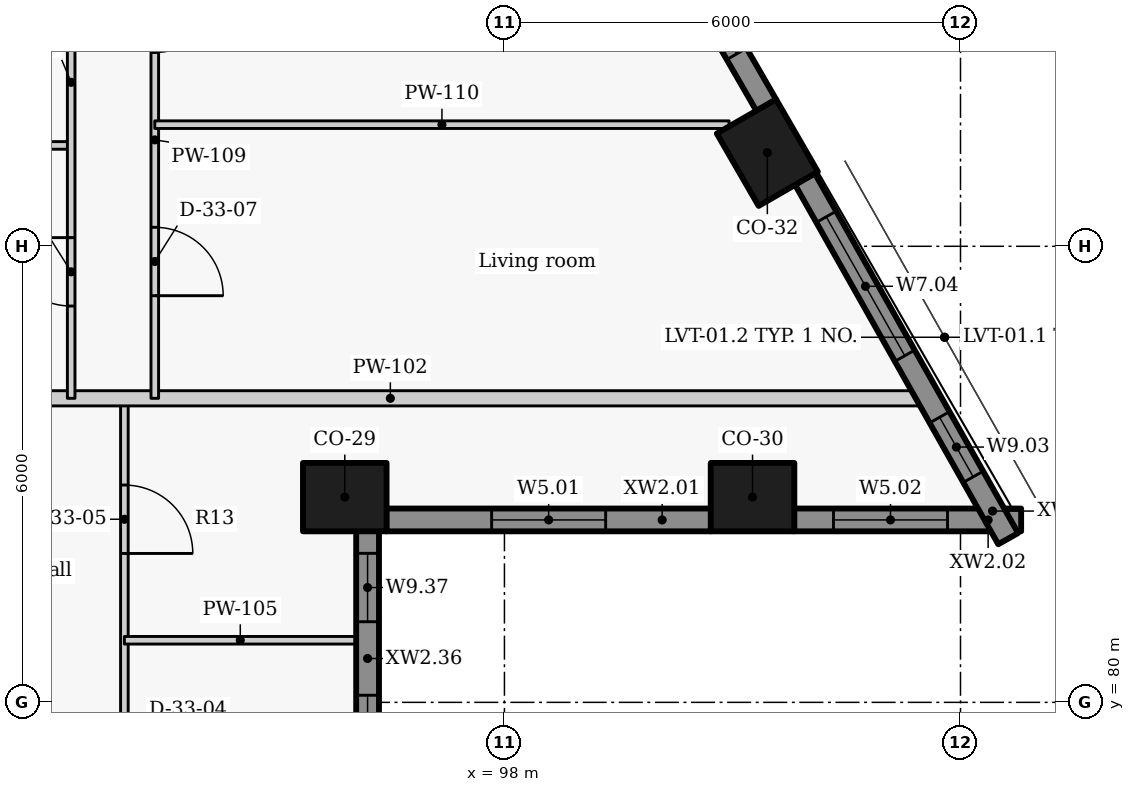
"""IFC4 building model, lengths in metres.
Left out: names, types, materials, properties, quantities, classifications, styles, units other than length and angle.
Written with IfcOpenShell. Run it as: python <this file> out.ifc"""

import sys

from ifc_helpers import new_model, si_unit, direction, frame, frame_2d, origin, origin_2d, place, context, subcontext, project, spatial, rectangle, extrude, element, fill, save


model = new_model("IFC4")
c1 = context("Model", 3, precision=1e-05, world=origin(), true_north=direction((0.0, 1.0)))
c2 = subcontext(c1, "Body", "Model", "MODEL_VIEW")
j1 = project(units=[si_unit("LENGTHUNIT", "METRE"), si_unit("PLANEANGLEUNIT", "RADIAN")], contexts=[c1])
p1 = place(None, origin())
s1 = spatial("IfcSite", under=j1, at=p1, CompositionType="ELEMENT")
p2 = place(p1, origin())
s2 = spatial("IfcBuilding", under=s1, at=p2, CompositionType="ELEMENT")
p3 = place(p2, frame((0.0, 0.0, 249.3)))
s3 = spatial("IfcBuildingStorey", under=s2, at=p3, CompositionType="ELEMENT", Elevation=249.3)
for number, where, z_axis, x_axis in (
    (1, (95.899, 82.7, 0.0), (0.0, 0.0, 1.0), (1.0, 0.0, 0.0)),
    (2, (101.264, 82.7, 0.0), (0.0, 0.0, 1.0), (1.0, 0.0, 0.0)),
    (3, (101.459, 87.232, 0.0), (0.0, 0.0, 1.0), (-0.5, 0.866, 0.0)),
):
    element("IfcColumn", number, at=place(p3, frame(where, z_axis=z_axis, x_axis=x_axis)), inside=s3, PredefinedType="COLUMN", context=c2, shape_type="SweptSolid", body=[
        extrude(rectangle(XDim=1.1, YDim=0.9, at=origin_2d()), origin(), (0.0, 0.0, 1.0), 3.3),
    ])
p4 = place(p3, frame((96.446, 82.4, 0.0), z_axis=(0.0, 0.0, 1.0), x_axis=(1.0, 0.0, 0.0)))
e4 = element("IfcWall", 4, at=p4, inside=s3, PredefinedType="SOLIDWALL", context=c2, shape_type="SweptSolid", body=[
    extrude(rectangle(XDim=4.272, YDim=0.3, at=frame_2d((2.136, 0.0))), origin(), (0.0, 0.0, 1.0), 2.425),
])
p5 = place(p4, frame((1.386, 0.0, 0.9)))
e5 = element("IfcOpeningElement", 5, at=p5, cuts=e4, PredefinedType="OPENING", context=c2, shape_type="SweptSolid", body=[
    extrude(rectangle(XDim=1.5, YDim=1.1, at=frame_2d((0.75, 0.55))), frame((0.0, 0.16, 0.0), z_axis=(0.0, -1.0, 0.0), x_axis=(1.0, 0.0, 0.0)), (0.0, 0.0, 1.0), 0.32),
])
p6 = place(p3, frame((101.81, 82.4, 0.0), z_axis=(0.0, 0.0, 1.0), x_axis=(1.0, 0.0, 0.0)))
e6 = element("IfcWall", 6, at=p6, inside=s3, PredefinedType="SOLIDWALL", context=c2, shape_type="SweptSolid", body=[
    extrude(rectangle(XDim=2.988, YDim=0.3, at=frame_2d((1.494, 0.0))), origin(), (0.0, 0.0, 1.0), 2.425),
])
p7 = place(p6, frame((0.519, 0.0, 0.9)))
e7 = element("IfcOpeningElement", 7, at=p7, cuts=e6, PredefinedType="OPENING", context=c2, shape_type="SweptSolid", body=[
    extrude(rectangle(XDim=1.5, YDim=1.1, at=frame_2d((0.75, 0.55))), frame((0.0, 0.16, 0.0), z_axis=(0.0, -1.0, 0.0), x_axis=(1.0, 0.0, 0.0)), (0.0, 0.0, 1.0), 0.32),
])
p8 = place(p3, frame((104.627, 82.154, 0.0), z_axis=(0.0, 0.0, 1.0), x_axis=(-0.492080931903, 0.870549456641, 0.0)))
e8 = element("IfcWall", 8, at=p8, inside=s3, PredefinedType="SOLIDWALL", context=c2, shape_type="SweptSolid", body=[
    extrude(rectangle(XDim=5.437, YDim=0.3, at=frame_2d((2.718, 0.0))), origin(), (0.0, 0.0, 1.0), 2.425),
])
p9 = place(p8, frame((0.934, 0.0, 0.9)))
e9 = element("IfcOpeningElement", 9, at=p9, cuts=e8, PredefinedType="OPENING", context=c2, shape_type="SweptSolid", body=[
    extrude(rectangle(XDim=0.9, YDim=1.1, at=frame_2d((0.45, 0.55))), frame((0.0, 0.16, 0.0), z_axis=(0.0, -1.0, 0.0), x_axis=(1.0, 0.0, 0.0)), (0.0, 0.0, 1.0), 0.32),
])
p10 = place(p8, frame((2.764, 0.0, 0.9)))
e10 = element("IfcOpeningElement", 10, at=p10, cuts=e8, PredefinedType="OPENING", context=c2, shape_type="SweptSolid", body=[
    extrude(rectangle(XDim=2.1, YDim=1.1, at=frame_2d((1.05, 0.55))), frame((0.0, 0.16, 0.0), z_axis=(0.0, -1.0, 0.0), x_axis=(1.0, 0.0, 0.0)), (0.0, 0.0, 1.0), 0.32),
])
p11 = place(p3, frame((101.446, 87.855, 0.0), z_axis=(0.0, 0.0, 1.0), x_axis=(-0.500010404316, 0.866019396766, 0.0)))
e11 = element("IfcWall", 11, at=p11, inside=s3, PredefinedType="SOLIDWALL", context=c2, shape_type="SweptSolid", body=[
    extrude(rectangle(XDim=3.547, YDim=0.3, at=frame_2d((1.774, 0.0))), origin(), (0.0, 0.0, 1.0), 2.425),
])
p12 = place(p11, frame((0.781, 0.0, 0.9)))
e12 = element("IfcOpeningElement", 12, at=p12, cuts=e11, PredefinedType="OPENING", context=c2, shape_type="SweptSolid", body=[
    extrude(rectangle(XDim=1.5, YDim=1.1, at=frame_2d((0.75, 0.55))), frame((0.0, 0.16, 0.0), z_axis=(0.0, -1.0, 0.0), x_axis=(1.0, 0.0, 0.0)), (0.0, 0.0, 1.0), 0.32),
])
p13 = place(p3, frame((96.199, 77.846, 0.0), z_axis=(0.0, 0.0, 1.0), x_axis=(0.0, 1.0, 0.0)))
e13 = element("IfcWall", 13, at=p13, inside=s3, PredefinedType="SOLIDWALL", context=c2, shape_type="SweptSolid", body=[
    extrude(rectangle(XDim=4.408, YDim=0.3, at=frame_2d((2.204, 0.0))), origin(), (0.0, 0.0, 1.0), 2.425),
])
p14 = place(p13, frame((0.748, 0.0, 0.9)))
e14 = element("IfcOpeningElement", 14, at=p14, cuts=e13, PredefinedType="OPENING", context=c2, shape_type="SweptSolid", body=[
    extrude(rectangle(XDim=1.5, YDim=1.1, at=frame_2d((0.75, 0.55))), frame((0.0, 0.16, 0.0), z_axis=(0.0, -1.0, 0.0), x_axis=(1.0, 0.0, 0.0)), (0.0, 0.0, 1.0), 0.32),
])
p15 = place(p13, frame((3.215, 0.0, 0.9)))
e15 = element("IfcOpeningElement", 15, at=p15, cuts=e13, PredefinedType="OPENING", context=c2, shape_type="SweptSolid", body=[
    extrude(rectangle(XDim=0.9, YDim=1.1, at=frame_2d((0.45, 0.55))), frame((0.0, 0.16, 0.0), z_axis=(0.0, -1.0, 0.0), x_axis=(1.0, 0.0, 0.0)), (0.0, 0.0, 1.0), 0.32),
])
p16 = place(p3, frame((93.0, 84.0, 0.0), z_axis=(0.0, 0.0, 1.0), x_axis=(0.0, -1.0, 0.0)))
e16 = element("IfcWall", 16, at=p16, inside=s3, PredefinedType="PARTITIONING", context=c2, shape_type="SweptSolid", body=[
    extrude(rectangle(XDim=14.5, YDim=0.1, at=frame_2d((7.25, 0.0))), origin(), (0.0, 0.0, 1.0), 3.025),
])
p17 = place(p16, frame((12.459, 0.0, 0.0)))
e17 = element("IfcOpeningElement", 17, at=p17, cuts=e16, PredefinedType="OPENING", context=c2, shape_type="SweptSolid", body=[
    extrude(rectangle(XDim=0.9, YDim=2.1, at=frame_2d((0.45, 1.05))), frame((0.0, 0.06, 0.0), z_axis=(0.0, -1.0, 0.0), x_axis=(1.0, 0.0, 0.0)), (0.0, 0.0, 1.0), 0.12),
])
p18 = place(p16, frame((8.391, 0.0, 0.0)))
e18 = element("IfcOpeningElement", 18, at=p18, cuts=e16, PredefinedType="OPENING", context=c2, shape_type="SweptSolid", body=[
    extrude(rectangle(XDim=0.9, YDim=2.1, at=frame_2d((0.45, 1.05))), frame((0.0, 0.06, 0.0), z_axis=(0.0, -1.0, 0.0), x_axis=(1.0, 0.0, 0.0)), (0.0, 0.0, 1.0), 0.12),
])
p19 = place(p16, frame((4.324, 0.0, 0.0)))
e19 = element("IfcOpeningElement", 19, at=p19, cuts=e16, PredefinedType="OPENING", context=c2, shape_type="SweptSolid", body=[
    extrude(rectangle(XDim=0.9, YDim=2.1, at=frame_2d((0.45, 1.05))), frame((0.0, 0.06, 0.0), z_axis=(0.0, -1.0, 0.0), x_axis=(1.0, 0.0, 0.0)), (0.0, 0.0, 1.0), 0.12),
])
p20 = place(p16, frame((1.141, 0.0, 0.0)))
e20 = element("IfcOpeningElement", 20, at=p20, cuts=e16, PredefinedType="OPENING", context=c2, shape_type="SweptSolid", body=[
    extrude(rectangle(XDim=0.9, YDim=2.1, at=frame_2d((0.45, 1.05))), frame((0.0, 0.06, 0.0), z_axis=(0.0, -1.0, 0.0), x_axis=(1.0, 0.0, 0.0)), (0.0, 0.0, 1.0), 0.12),
])
p21 = place(p3, frame((89.5, 84.0, 0.0), z_axis=(0.0, 0.0, 1.0), x_axis=(1.0, 0.0, 0.0)))
e21 = element("IfcWall", 21, at=p21, inside=s3, PredefinedType="PARTITIONING", context=c2, shape_type="SweptSolid", body=[
    extrude(rectangle(XDim=13.998, YDim=0.2, at=frame_2d((6.999, 0.0))), origin(), (0.0, 0.0, 1.0), 2.405),
])
p22 = place(p3, frame((93.0, 80.817, 0.0), z_axis=(0.0, 0.0, 1.0), x_axis=(1.0, 0.0, 0.0)))
e22 = element("IfcWall", 22, at=p22, inside=s3, PredefinedType="PARTITIONING", context=c2, shape_type="SweptSolid", body=[
    extrude(rectangle(XDim=3.05, YDim=0.1, at=frame_2d((1.525, 0.0))), origin(), (0.0, 0.0, 1.0), 2.405),
])
p23 = place(p3, frame((89.5, 87.327, 0.0), z_axis=(0.0, 0.0, 1.0), x_axis=(1.0, 0.0, 0.0)))
e23 = element("IfcWall", 23, at=p23, inside=s3, PredefinedType="PARTITIONING", context=c2, shape_type="SweptSolid", body=[
    extrude(rectangle(XDim=2.8, YDim=0.1, at=frame_2d((1.4, 0.0))), origin(), (0.0, 0.0, 1.0), 2.505),
])
p24 = place(p3, frame((92.3, 84.0, 0.0), z_axis=(0.0, 0.0, 1.0), x_axis=(0.0, 1.0, 0.0)))
e24 = element("IfcWall", 24, at=p24, inside=s3, PredefinedType="PARTITIONING", context=c2, shape_type="SweptSolid", body=[
    extrude(rectangle(XDim=6.1, YDim=0.1, at=frame_2d((3.05, 0.0))), origin(), (0.0, 0.0, 1.0), 3.025),
])
p25 = place(p24, frame((1.214, 0.0, 0.0)))
e25 = element("IfcOpeningElement", 25, at=p25, cuts=e24, PredefinedType="OPENING", context=c2, shape_type="SweptSolid", body=[
    extrude(rectangle(XDim=0.9, YDim=2.1, at=frame_2d((0.45, 1.05))), frame((0.0, 0.06, 0.0), z_axis=(0.0, -1.0, 0.0), x_axis=(1.0, 0.0, 0.0)), (0.0, 0.0, 1.0), 0.12),
])
p26 = place(p3, frame((93.4, 93.2, 0.0), z_axis=(0.0, 0.0, 1.0), x_axis=(0.0, -1.0, 0.0)))
e26 = element("IfcWall", 26, at=p26, inside=s3, PredefinedType="PARTITIONING", context=c2, shape_type="SweptSolid", body=[
    extrude(rectangle(XDim=9.2, YDim=0.1, at=frame_2d((4.6, 0.0))), origin(), (0.0, 0.0, 1.0), 3.025),
])
p27 = place(p26, frame((6.95, 0.0, 0.0)))
e27 = element("IfcOpeningElement", 27, at=p27, cuts=e26, PredefinedType="OPENING", context=c2, shape_type="SweptSolid", body=[
    extrude(rectangle(XDim=0.9, YDim=2.1, at=frame_2d((0.45, 1.05))), frame((0.0, 0.06, 0.0), z_axis=(0.0, -1.0, 0.0), x_axis=(1.0, 0.0, 0.0)), (0.0, 0.0, 1.0), 0.12),
])
p28 = place(p26, frame((3.75, 0.0, 0.0)))
e28 = element("IfcOpeningElement", 28, at=p28, cuts=e26, PredefinedType="OPENING", context=c2, shape_type="SweptSolid", body=[
    extrude(rectangle(XDim=0.9, YDim=2.1, at=frame_2d((0.45, 1.05))), frame((0.0, 0.06, 0.0), z_axis=(0.0, -1.0, 0.0), x_axis=(1.0, 0.0, 0.0)), (0.0, 0.0, 1.0), 0.12),
])
p29 = place(p26, frame((0.95, 0.0, 0.0)))
e29 = element("IfcOpeningElement", 29, at=p29, cuts=e26, PredefinedType="OPENING", context=c2, shape_type="SweptSolid", body=[
    extrude(rectangle(XDim=0.9, YDim=2.1, at=frame_2d((0.45, 1.05))), frame((0.0, 0.06, 0.0), z_axis=(0.0, -1.0, 0.0), x_axis=(1.0, 0.0, 0.0)), (0.0, 0.0, 1.0), 0.12),
])
p30 = place(p3, frame((93.4, 87.6, 0.0), z_axis=(0.0, 0.0, 1.0), x_axis=(1.0, 0.0, 0.0)))
e30 = element("IfcWall", 30, at=p30, inside=s3, PredefinedType="PARTITIONING", context=c2, shape_type="SweptSolid", body=[
    extrude(rectangle(XDim=7.556, YDim=0.1, at=frame_2d((3.778, 0.0))), origin(), (0.0, 0.0, 1.0), 3.025),
])
p31 = place(p5, origin())
e31 = element("IfcWindow", 31, at=p31, inside=s3, PartitioningType="SINGLE_PANEL", PredefinedType="WINDOW", context=c2, shape_type="SweptSolid", body=[
    extrude(rectangle(XDim=1.5, YDim=1.1, at=frame_2d((0.75, 0.55))), frame((0.0, 0.03, 0.0), z_axis=(0.0, -1.0, 0.0), x_axis=(1.0, 0.0, 0.0)), (0.0, 0.0, 1.0), 0.06),
])
fill(e5, e31)
p32 = place(p7, origin())
e32 = element("IfcWindow", 32, at=p32, inside=s3, PartitioningType="SINGLE_PANEL", PredefinedType="WINDOW", context=c2, shape_type="SweptSolid", body=[
    extrude(rectangle(XDim=1.5, YDim=1.1, at=frame_2d((0.75, 0.55))), frame((0.0, 0.03, 0.0), z_axis=(0.0, -1.0, 0.0), x_axis=(1.0, 0.0, 0.0)), (0.0, 0.0, 1.0), 0.06),
])
fill(e7, e32)
p33 = place(p9, origin())
e33 = element("IfcWindow", 33, at=p33, inside=s3, PartitioningType="SINGLE_PANEL", PredefinedType="WINDOW", context=c2, shape_type="SweptSolid", body=[
    extrude(rectangle(XDim=0.9, YDim=1.1, at=frame_2d((0.45, 0.55))), frame((0.0, 0.03, 0.0), z_axis=(0.0, -1.0, 0.0), x_axis=(1.0, 0.0, 0.0)), (0.0, 0.0, 1.0), 0.06),
])
fill(e9, e33)
p34 = place(p10, origin())
e34 = element("IfcWindow", 34, at=p34, inside=s3, PartitioningType="SINGLE_PANEL", PredefinedType="WINDOW", context=c2, shape_type="SweptSolid", body=[
    extrude(rectangle(XDim=2.1, YDim=1.1, at=frame_2d((1.05, 0.55))), frame((0.0, 0.03, 0.0), z_axis=(0.0, -1.0, 0.0), x_axis=(1.0, 0.0, 0.0)), (0.0, 0.0, 1.0), 0.06),
])
fill(e10, e34)
p35 = place(p12, origin())
e35 = element("IfcWindow", 35, at=p35, inside=s3, PartitioningType="SINGLE_PANEL", PredefinedType="WINDOW", context=c2, shape_type="SweptSolid", body=[
    extrude(rectangle(XDim=1.5, YDim=1.1, at=frame_2d((0.75, 0.55))), frame((0.0, 0.03, 0.0), z_axis=(0.0, -1.0, 0.0), x_axis=(1.0, 0.0, 0.0)), (0.0, 0.0, 1.0), 0.06),
])
fill(e12, e35)
p36 = place(p14, origin())
e36 = element("IfcWindow", 36, at=p36, inside=s3, PartitioningType="SINGLE_PANEL", PredefinedType="WINDOW", context=c2, shape_type="SweptSolid", body=[
    extrude(rectangle(XDim=1.5, YDim=1.1, at=frame_2d((0.75, 0.55))), frame((0.0, 0.03, 0.0), z_axis=(0.0, -1.0, 0.0), x_axis=(1.0, 0.0, 0.0)), (0.0, 0.0, 1.0), 0.06),
])
fill(e14, e36)
p37 = place(p15, origin())
e37 = element("IfcWindow", 37, at=p37, inside=s3, PartitioningType="SINGLE_PANEL", PredefinedType="WINDOW", context=c2, shape_type="SweptSolid", body=[
    extrude(rectangle(XDim=0.9, YDim=1.1, at=frame_2d((0.45, 0.55))), frame((0.0, 0.03, 0.0), z_axis=(0.0, -1.0, 0.0), x_axis=(1.0, 0.0, 0.0)), (0.0, 0.0, 1.0), 0.06),
])
fill(e15, e37)
p38 = place(p20, origin())
e38 = element("IfcDoor", 38, at=p38, inside=s3, OperationType="SINGLE_SWING_RIGHT", PredefinedType="DOOR", context=c2, shape_type="SweptSolid", body=[
    extrude(rectangle(XDim=0.9, YDim=2.1, at=frame_2d((0.45, 1.05))), frame((0.0, 0.025, 0.0), z_axis=(0.0, -1.0, 0.0), x_axis=(1.0, 0.0, 0.0)), (0.0, 0.0, 1.0), 0.05),
])
fill(e20, e38)
p39 = place(p25, origin())
e39 = element("IfcDoor", 39, at=p39, inside=s3, OperationType="SINGLE_SWING_RIGHT", PredefinedType="DOOR", context=c2, shape_type="SweptSolid", body=[
    extrude(rectangle(XDim=0.9, YDim=2.1, at=frame_2d((0.45, 1.05))), frame((0.0, 0.025, 0.0), z_axis=(0.0, -1.0, 0.0), x_axis=(1.0, 0.0, 0.0)), (0.0, 0.0, 1.0), 0.05),
])
fill(e25, e39)
p40 = place(p27, origin())
e40 = element("IfcDoor", 40, at=p40, inside=s3, OperationType="SINGLE_SWING_RIGHT", PredefinedType="DOOR", context=c2, shape_type="SweptSolid", body=[
    extrude(rectangle(XDim=0.9, YDim=2.1, at=frame_2d((0.45, 1.05))), frame((0.0, 0.025, 0.0), z_axis=(0.0, -1.0, 0.0), x_axis=(1.0, 0.0, 0.0)), (0.0, 0.0, 1.0), 0.05),
])
fill(e27, e40)
save(model, sys.argv[1])
